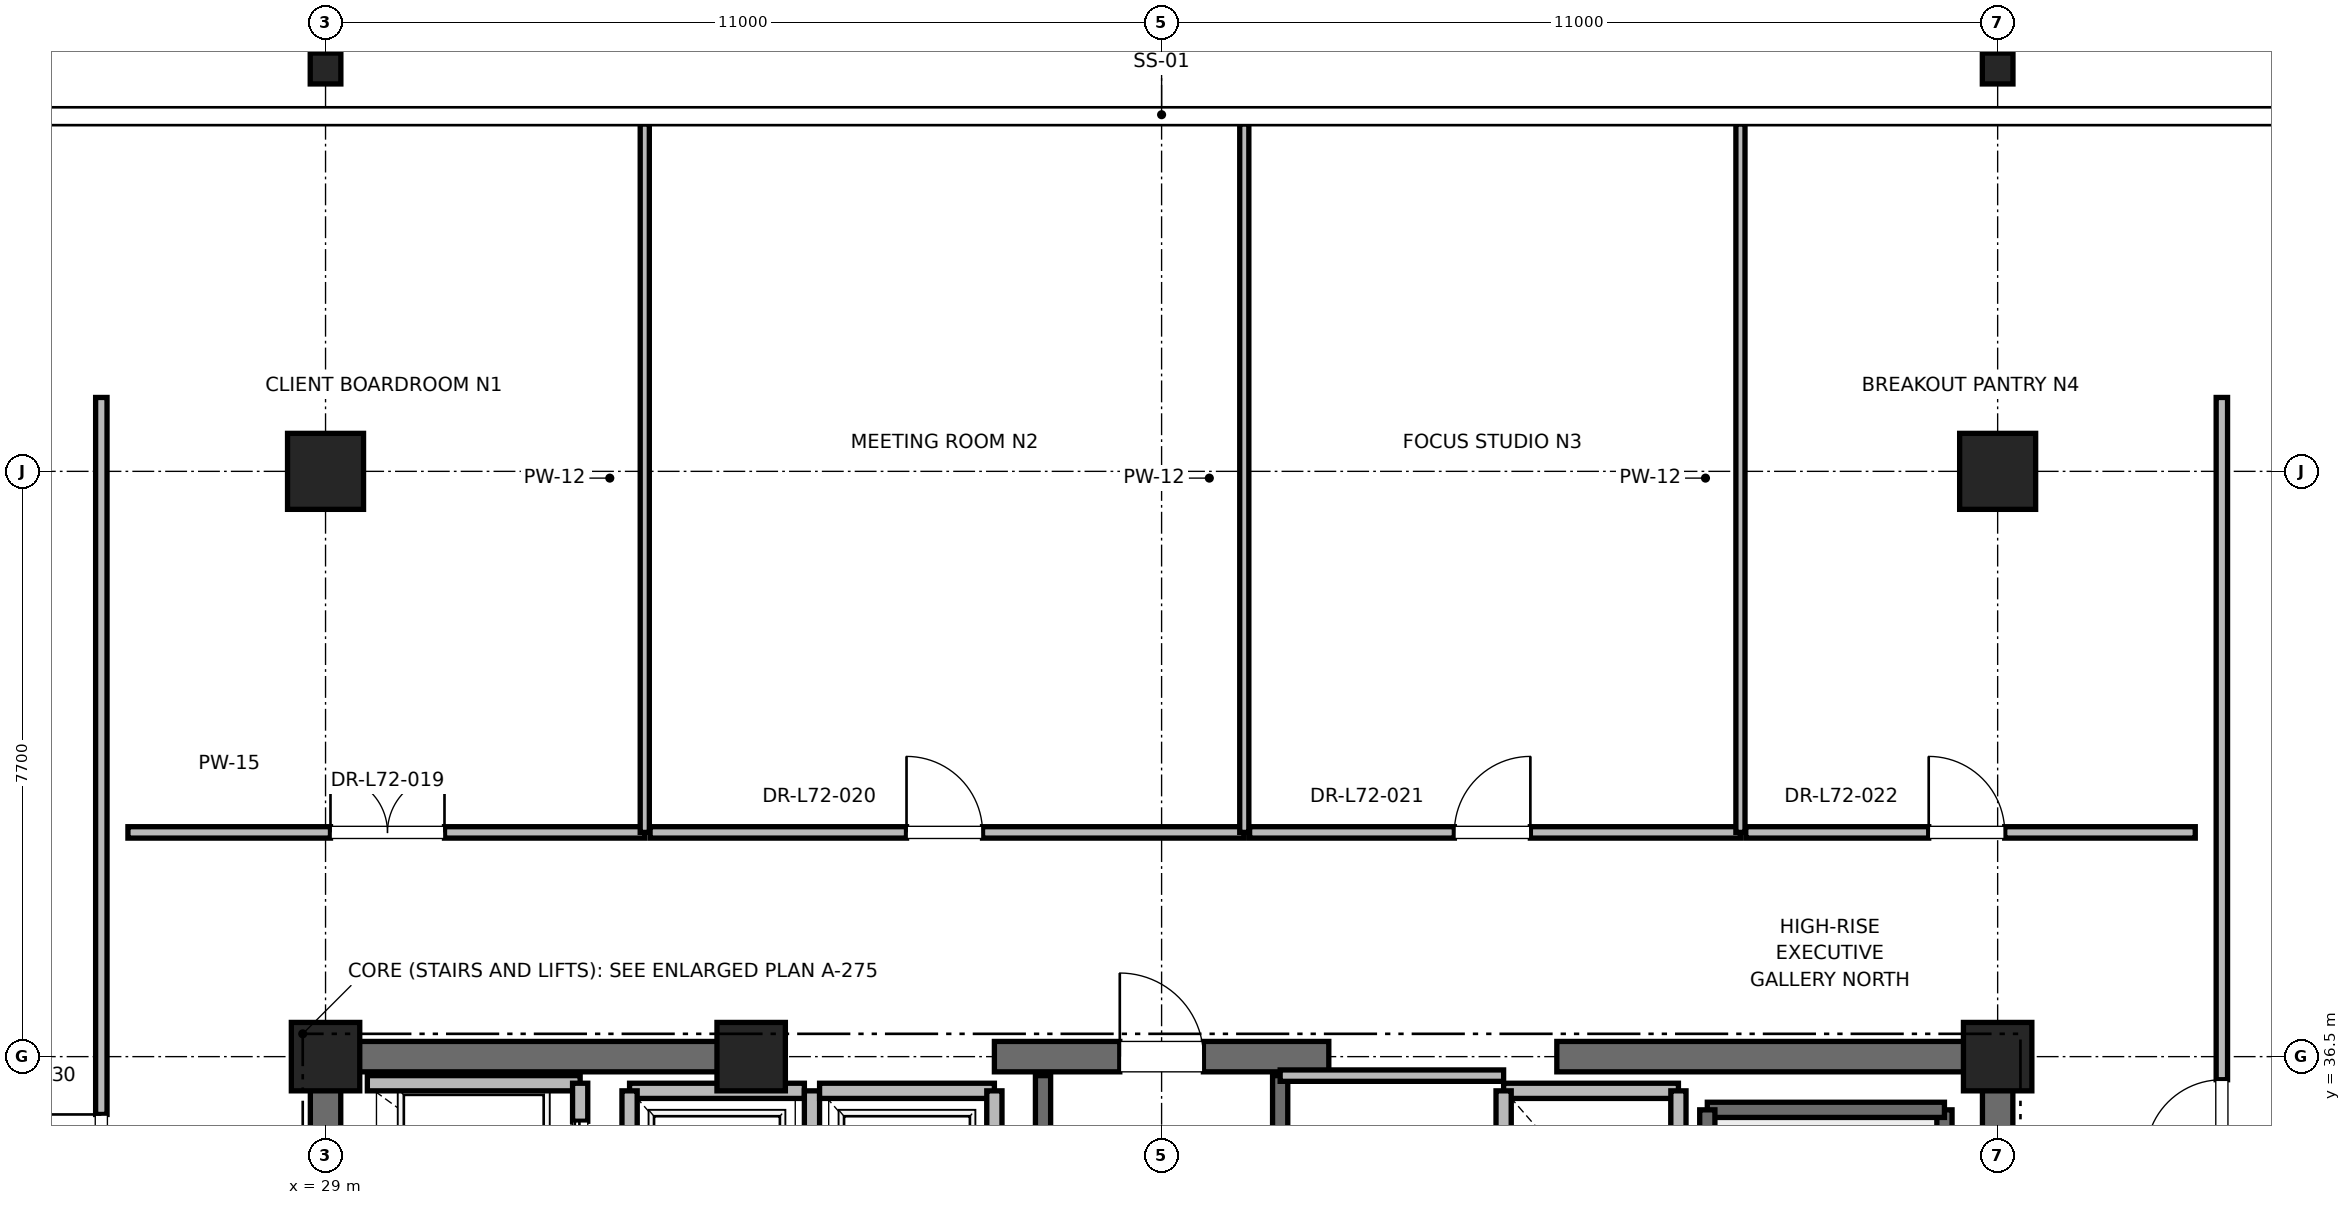
"""IFC4 building model, lengths in metres.
Left out: names, types, materials, properties, quantities, classifications, styles, units other than length and angle.
Written with IfcOpenShell. Run it as: python <this file> out.ifc"""

import sys

from ifc_helpers import new_model, si_unit, direction, frame, frame_2d, origin, origin_2d, place, context, subcontext, project, spatial, rectangle, i_section, extrude, element, fill, save


model = new_model("IFC4")
c1 = context("Model", 3, precision=1e-05, world=origin(), true_north=direction((0.0, 1.0)))
c2 = subcontext(c1, "Body", "Model", "MODEL_VIEW")
j1 = project(units=[si_unit("LENGTHUNIT", "METRE"), si_unit("PLANEANGLEUNIT", "RADIAN")], contexts=[c1])
p1 = place(None, origin())
s1 = spatial("IfcSite", under=j1, at=p1, CompositionType="ELEMENT")
p2 = place(p1, origin())
s2 = spatial("IfcBuilding", under=s1, at=p2, CompositionType="ELEMENT")
p3 = place(p2, frame((0.0, 0.0, 310.8)))
s3 = spatial("IfcBuildingStorey", under=s2, at=p3, CompositionType="ELEMENT", Elevation=310.8)
for number, where, z_axis, x_axis in (
    (1, (29.0, 44.2, 0.0), (0.0, 0.0, 1.0), (1.0, 0.0, 0.0)),
    (2, (51.0, 44.2, 0.0), (0.0, 0.0, 1.0), (1.0, 0.0, 0.0)),
):
    element("IfcColumn", number, at=place(p3, frame(where, z_axis=z_axis, x_axis=x_axis)), inside=s3, PredefinedType="COLUMN", context=c2, shape_type="SweptSolid", body=[
        extrude(rectangle(XDim=1.0, YDim=1.0, at=origin_2d()), origin(), (0.0, 0.0, 1.0), 4.0),
    ])
for number, where, z_axis, x_axis in (
    (3, (29.0, 49.5, 0.0), (0.0, 0.0, 1.0), (1.0, 0.0, 0.0)),
    (4, (51.0, 49.5, 0.0), (0.0, 0.0, 1.0), (1.0, 0.0, 0.0)),
):
    element("IfcColumn", number, at=place(p3, frame(where, z_axis=z_axis, x_axis=x_axis)), inside=s3, PredefinedType="COLUMN", context=c2, shape_type="SweptSolid", body=[
        extrude(i_section(OverallWidth=0.403, OverallDepth=0.406, WebThickness=0.027, FlangeThickness=0.043, FilletRadius=0.015, at=origin_2d()), origin(), (0.0, 0.0, 1.0), 4.0),
    ])
for number, where, z_axis, x_axis in (
    (5, (29.0, 36.5, 0.0), (0.0, 0.0, 1.0), (1.0, 0.0, 0.0)),
    (6, (51.0, 36.5, 0.0), (0.0, 0.0, 1.0), (1.0, 0.0, 0.0)),
    (7, (34.6, 36.5, 0.0), (0.0, 0.0, 1.0), (1.0, 0.0, 0.0)),
):
    element("IfcColumn", number, at=place(p3, frame(where, z_axis=z_axis, x_axis=x_axis)), inside=s3, PredefinedType="PILASTER", context=c2, shape_type="SweptSolid", body=[
        extrude(rectangle(XDim=0.9, YDim=0.9, at=origin_2d()), origin(), (0.0, 0.0, 1.0), 4.0),
    ])
p4 = place(p3, frame((29.0, 36.5, 0.0), z_axis=(0.0, 0.0, 1.0), x_axis=(1.0, 0.0, 0.0)))
e8 = element("IfcWall", 8, at=p4, inside=s3, PredefinedType="SHEAR", context=c2, shape_type="SweptSolid", body=[
    extrude(rectangle(XDim=5.8, YDim=0.4, at=frame_2d((2.9, 0.0))), origin(), (0.0, 0.0, 1.0), 3.785),
])
p5 = place(p3, frame((37.8, 36.5, 0.0), z_axis=(0.0, 0.0, 1.0), x_axis=(1.0, 0.0, 0.0)))
e9 = element("IfcWall", 9, at=p5, inside=s3, PredefinedType="SHEAR", context=c2, shape_type="SweptSolid", body=[
    extrude(rectangle(XDim=4.4, YDim=0.4, at=frame_2d((2.2, 0.0))), origin(), (0.0, 0.0, 1.0), 3.785),
])
p6 = place(p5, frame((1.65, 0.0, 0.0)))
e10 = element("IfcOpeningElement", 10, at=p6, cuts=e9, PredefinedType="OPENING", context=c2, shape_type="SweptSolid", body=[
    extrude(rectangle(XDim=1.1, YDim=2.15, at=frame_2d((0.55, 1.075))), frame((0.0, 0.2, 0.0), z_axis=(0.0, -1.0, 0.0), x_axis=(1.0, 0.0, 0.0)), (0.0, 0.0, 1.0), 0.4),
])
for number, where, z_axis, x_axis in (
    (11, (45.2, 36.5, 0.0), (0.0, 0.0, 1.0), (1.0, 0.0, 0.0)),
    (12, (29.0, 30.7, 0.0), (0.0, 0.0, 1.0), (0.0, 1.0, 0.0)),
):
    element("IfcWall", number, at=place(p3, frame(where, z_axis=z_axis, x_axis=x_axis)), inside=s3, PredefinedType="SHEAR", context=c2, shape_type="SweptSolid", body=[
        extrude(rectangle(XDim=5.8, YDim=0.4, at=frame_2d((2.9, 0.0))), origin(), (0.0, 0.0, 1.0), 3.785),
    ])
p7 = place(p3, frame((51.0, 27.7, 0.0), z_axis=(0.0, 0.0, 1.0), x_axis=(0.0, 1.0, 0.0)))
e13 = element("IfcWall", 13, at=p7, inside=s3, PredefinedType="SHEAR", context=c2, shape_type="SweptSolid", body=[
    extrude(rectangle(XDim=8.8, YDim=0.4, at=frame_2d((4.4, 0.0))), origin(), (0.0, 0.0, 1.0), 3.785),
])
p8 = place(p3, frame((50.3, 27.65, 0.0), z_axis=(0.0, 0.0, 1.0), x_axis=(0.0, 1.0, 0.0)))
e14 = element("IfcWall", 14, at=p8, inside=s3, PredefinedType="SOLIDWALL", context=c2, shape_type="SweptSolid", body=[
    extrude(rectangle(XDim=8.15, YDim=0.2, at=frame_2d((4.075, 0.0))), origin(), (0.0, 0.0, 1.0), 3.785),
])
p9 = place(p3, frame((47.18, 35.8, 0.0), z_axis=(0.0, 0.0, 1.0), x_axis=(1.0, 0.0, 0.0)))
e15 = element("IfcWall", 15, at=p9, inside=s3, PredefinedType="SOLIDWALL", context=c2, shape_type="SweptSolid", body=[
    extrude(rectangle(XDim=3.12, YDim=0.2, at=frame_2d((1.56, 0.0))), origin(), (0.0, 0.0, 1.0), 3.785),
])
p10 = place(p3, frame((47.18, 27.62, 0.0), z_axis=(0.0, 0.0, 1.0), x_axis=(0.0, 1.0, 0.0)))
e16 = element("IfcWall", 16, at=p10, inside=s3, PredefinedType="SOLIDWALL", context=c2, shape_type="SweptSolid", body=[
    extrude(rectangle(XDim=8.18, YDim=0.2, at=frame_2d((4.09, 0.0))), origin(), (0.0, 0.0, 1.0), 3.785),
])
p11 = place(p3, frame((38.44, 27.38, 0.0), z_axis=(0.0, 0.0, 1.0), x_axis=(0.0, 1.0, 0.0)))
e17 = element("IfcWall", 17, at=p11, inside=s3, PredefinedType="SOLIDWALL", context=c2, shape_type="SweptSolid", body=[
    extrude(rectangle(XDim=8.87, YDim=0.2, at=frame_2d((4.435, 0.0))), origin(), (0.0, 0.0, 1.0), 3.785),
])
p12 = place(p3, frame((41.56, 27.68, 0.0), z_axis=(0.0, 0.0, 1.0), x_axis=(0.0, 1.0, 0.0)))
e18 = element("IfcWall", 18, at=p12, inside=s3, PredefinedType="SOLIDWALL", context=c2, shape_type="SweptSolid", body=[
    extrude(rectangle(XDim=8.57, YDim=0.2, at=frame_2d((4.285, 0.0))), origin(), (0.0, 0.0, 1.0), 3.785),
])
p13 = place(p3, frame((32.35, 36.15, 0.0), z_axis=(0.0, 0.0, 1.0), x_axis=(-1.0, 0.0, 0.0)))
e19 = element("IfcWall", 19, at=p13, inside=s3, PredefinedType="SOLIDWALL", context=c2, shape_type="SweptSolid", body=[
    extrude(rectangle(XDim=2.8, YDim=0.2, at=frame_2d((1.4, 0.0))), origin(), (0.0, 0.0, 1.0), 3.22),
])
p14 = place(p3, frame((32.35, 34.05, 0.0), z_axis=(0.0, 0.0, 1.0), x_axis=(0.0, 1.0, 0.0)))
e20 = element("IfcWall", 20, at=p14, inside=s3, PredefinedType="SOLIDWALL", context=c2, shape_type="SweptSolid", body=[
    extrude(rectangle(XDim=2.1, YDim=0.2, at=frame_2d((1.05, 0.0))), origin(), (0.0, 0.0, 1.0), 3.785),
])
p15 = place(p14, frame((0.5, 0.0, 0.0)))
e21 = element("IfcOpeningElement", 21, at=p15, cuts=e20, PredefinedType="OPENING", context=c2, shape_type="SweptSolid", body=[
    extrude(rectangle(XDim=1.1, YDim=2.2, at=frame_2d((0.55, 1.1))), frame((0.0, 0.1, 0.0), z_axis=(0.0, -1.0, 0.0), x_axis=(1.0, 0.0, 0.0)), (0.0, 0.0, 1.0), 0.2),
])
p16 = place(p3, frame((35.3, 36.05, 0.0), z_axis=(0.0, 0.0, 1.0), x_axis=(-1.0, 0.0, 0.0)))
e22 = element("IfcWall", 22, at=p16, inside=s3, PredefinedType="SOLIDWALL", context=c2, shape_type="SweptSolid", body=[
    extrude(rectangle(XDim=2.3, YDim=0.2, at=frame_2d((1.15, 0.0))), origin(), (0.0, 0.0, 1.0), 2.865),
])
p17 = place(p3, frame((33.0, 36.05, 0.0), z_axis=(0.0, 0.0, 1.0), x_axis=(0.0, -1.0, 0.0)))
e23 = element("IfcWall", 23, at=p17, inside=s3, PredefinedType="SOLIDWALL", context=c2, shape_type="SweptSolid", body=[
    extrude(rectangle(XDim=2.6, YDim=0.2, at=frame_2d((1.3, 0.0))), origin(), (0.0, 0.0, 1.0), 3.785),
])
p18 = place(p3, frame((35.4, 33.45, 0.0), z_axis=(0.0, 0.0, 1.0), x_axis=(0.0, 1.0, 0.0)))
e24 = element("IfcWall", 24, at=p18, inside=s3, PredefinedType="SOLIDWALL", context=c2, shape_type="SweptSolid", body=[
    extrude(rectangle(XDim=2.6, YDim=0.2, at=frame_2d((1.3, 0.0))), origin(), (0.0, 0.0, 1.0), 2.865),
])
p19 = place(p3, frame((37.8, 36.05, 0.0), z_axis=(0.0, 0.0, 1.0), x_axis=(-1.0, 0.0, 0.0)))
e25 = element("IfcWall", 25, at=p19, inside=s3, PredefinedType="SOLIDWALL", context=c2, shape_type="SweptSolid", body=[
    extrude(rectangle(XDim=2.3, YDim=0.2, at=frame_2d((1.15, 0.0))), origin(), (0.0, 0.0, 1.0), 2.865),
])
p20 = place(p3, frame((37.8, 33.45, 0.0), z_axis=(0.0, 0.0, 1.0), x_axis=(0.0, 1.0, 0.0)))
e26 = element("IfcWall", 26, at=p20, inside=s3, PredefinedType="SOLIDWALL", context=c2, shape_type="SweptSolid", body=[
    extrude(rectangle(XDim=2.6, YDim=0.2, at=frame_2d((1.3, 0.0))), origin(), (0.0, 0.0, 1.0), 2.865),
])
p21 = place(p3, frame((46.8, 36.05, 0.0), z_axis=(0.0, 0.0, 1.0), x_axis=(-1.0, 0.0, 0.0)))
e27 = element("IfcWall", 27, at=p21, inside=s3, PredefinedType="SOLIDWALL", context=c2, shape_type="SweptSolid", body=[
    extrude(rectangle(XDim=2.3, YDim=0.2, at=frame_2d((1.15, 0.0))), origin(), (0.0, 0.0, 1.0), 2.865),
])
p22 = place(p3, frame((44.5, 36.05, 0.0), z_axis=(0.0, 0.0, 1.0), x_axis=(0.0, -1.0, 0.0)))
e28 = element("IfcWall", 28, at=p22, inside=s3, PredefinedType="SOLIDWALL", context=c2, shape_type="SweptSolid", body=[
    extrude(rectangle(XDim=2.6, YDim=0.2, at=frame_2d((1.3, 0.0))), origin(), (0.0, 0.0, 1.0), 2.865),
])
p23 = place(p3, frame((46.8, 33.45, 0.0), z_axis=(0.0, 0.0, 1.0), x_axis=(0.0, 1.0, 0.0)))
e29 = element("IfcWall", 29, at=p23, inside=s3, PredefinedType="SOLIDWALL", context=c2, shape_type="SweptSolid", body=[
    extrude(rectangle(XDim=2.6, YDim=0.2, at=frame_2d((1.3, 0.0))), origin(), (0.0, 0.0, 1.0), 3.785),
])
p24 = place(p3, frame((41.56, 36.25, 0.0), z_axis=(0.0, 0.0, 1.0), x_axis=(1.0, 0.0, 0.0)))
e30 = element("IfcWall", 30, at=p24, inside=s3, PredefinedType="PARTITIONING", context=c2, shape_type="SweptSolid", body=[
    extrude(rectangle(XDim=2.94, YDim=0.15, at=frame_2d((1.47, 0.0))), origin(), (0.0, 0.0, 1.0), 2.85),
])
p25 = place(p3, frame((26.4, 39.45, 0.0), z_axis=(0.0, 0.0, 1.0), x_axis=(1.0, 0.0, 0.0)))
e31 = element("IfcWall", 31, at=p25, inside=s3, PredefinedType="PARTITIONING", context=c2, shape_type="SweptSolid", body=[
    extrude(rectangle(XDim=6.8, YDim=0.15, at=frame_2d((3.4, 0.0))), origin(), (0.0, 0.0, 1.0), 2.85),
])
p26 = place(p25, frame((2.665, 0.0, 0.0)))
e32 = element("IfcOpeningElement", 32, at=p26, cuts=e31, PredefinedType="OPENING", context=c2, shape_type="SweptSolid", body=[
    extrude(rectangle(XDim=1.5, YDim=2.25, at=frame_2d((0.75, 1.125))), frame((0.0, 0.075, 0.0), z_axis=(0.0, -1.0, 0.0), x_axis=(1.0, 0.0, 0.0)), (0.0, 0.0, 1.0), 0.15),
])
p27 = place(p3, frame((33.2, 39.45, 0.0), z_axis=(0.0, 0.0, 1.0), x_axis=(0.0, 1.0, 0.0)))
e33 = element("IfcWall", 33, at=p27, inside=s3, PredefinedType="PARTITIONING", context=c2, shape_type="SweptSolid", body=[
    extrude(rectangle(XDim=9.322, YDim=0.12, at=frame_2d((4.661, 0.0))), origin(), (0.0, 0.0, 1.0), 2.415),
])
p28 = place(p3, frame((33.27, 39.45, 0.0), z_axis=(0.0, 0.0, 1.0), x_axis=(1.0, 0.0, 0.0)))
e34 = element("IfcWall", 34, at=p28, inside=s3, PredefinedType="PARTITIONING", context=c2, shape_type="SweptSolid", body=[
    extrude(rectangle(XDim=7.818, YDim=0.15, at=frame_2d((3.909, 0.0))), origin(), (0.0, 0.0, 1.0), 2.85),
])
p29 = place(p28, frame((3.374, 0.0, 0.0)))
e35 = element("IfcOpeningElement", 35, at=p29, cuts=e34, PredefinedType="OPENING", context=c2, shape_type="SweptSolid", body=[
    extrude(rectangle(XDim=1.0, YDim=2.15, at=frame_2d((0.5, 1.075))), frame((0.0, 0.075, 0.0), z_axis=(0.0, -1.0, 0.0), x_axis=(1.0, 0.0, 0.0)), (0.0, 0.0, 1.0), 0.15),
])
p30 = place(p3, frame((41.088, 39.45, 0.0), z_axis=(0.0, 0.0, 1.0), x_axis=(0.0, 1.0, 0.0)))
e36 = element("IfcWall", 36, at=p30, inside=s3, PredefinedType="PARTITIONING", context=c2, shape_type="SweptSolid", body=[
    extrude(rectangle(XDim=9.322, YDim=0.12, at=frame_2d((4.661, 0.0))), origin(), (0.0, 0.0, 1.0), 2.415),
])
p31 = place(p3, frame((41.158, 39.45, 0.0), z_axis=(0.0, 0.0, 1.0), x_axis=(1.0, 0.0, 0.0)))
e37 = element("IfcWall", 37, at=p31, inside=s3, PredefinedType="PARTITIONING", context=c2, shape_type="SweptSolid", body=[
    extrude(rectangle(XDim=6.458, YDim=0.15, at=frame_2d((3.229, 0.0))), origin(), (0.0, 0.0, 1.0), 2.85),
])
p32 = place(p31, frame((2.694, 0.0, 0.0)))
e38 = element("IfcOpeningElement", 38, at=p32, cuts=e37, PredefinedType="OPENING", context=c2, shape_type="SweptSolid", body=[
    extrude(rectangle(XDim=1.0, YDim=2.15, at=frame_2d((0.5, 1.075))), frame((0.0, 0.075, 0.0), z_axis=(0.0, -1.0, 0.0), x_axis=(1.0, 0.0, 0.0)), (0.0, 0.0, 1.0), 0.15),
])
p33 = place(p3, frame((47.616, 39.45, 0.0), z_axis=(0.0, 0.0, 1.0), x_axis=(0.0, 1.0, 0.0)))
e39 = element("IfcWall", 39, at=p33, inside=s3, PredefinedType="PARTITIONING", context=c2, shape_type="SweptSolid", body=[
    extrude(rectangle(XDim=9.322, YDim=0.12, at=frame_2d((4.661, 0.0))), origin(), (0.0, 0.0, 1.0), 2.415),
])
p34 = place(p3, frame((47.686, 39.45, 0.0), z_axis=(0.0, 0.0, 1.0), x_axis=(1.0, 0.0, 0.0)))
e40 = element("IfcWall", 40, at=p34, inside=s3, PredefinedType="PARTITIONING", context=c2, shape_type="SweptSolid", body=[
    extrude(rectangle(XDim=5.914, YDim=0.15, at=frame_2d((2.957, 0.0))), origin(), (0.0, 0.0, 1.0), 2.85),
])
p35 = place(p34, frame((2.407, 0.0, 0.0)))
e41 = element("IfcOpeningElement", 41, at=p35, cuts=e40, PredefinedType="OPENING", context=c2, shape_type="SweptSolid", body=[
    extrude(rectangle(XDim=1.0, YDim=2.15, at=frame_2d((0.5, 1.075))), frame((0.0, 0.075, 0.0), z_axis=(0.0, -1.0, 0.0), x_axis=(1.0, 0.0, 0.0)), (0.0, 0.0, 1.0), 0.15),
])
p36 = place(p3, frame((26.05, 33.579, 0.0), z_axis=(0.0, 0.0, 1.0), x_axis=(0.0, 1.0, 0.0)))
e42 = element("IfcWall", 42, at=p36, inside=s3, PredefinedType="PARTITIONING", context=c2, shape_type="SweptSolid", body=[
    extrude(rectangle(XDim=11.594, YDim=0.15, at=frame_2d((5.797, 0.0))), origin(), (0.0, 0.0, 1.0), 2.85),
])
p37 = place(p36, frame((0.661, 0.0, 0.0)))
e43 = element("IfcOpeningElement", 43, at=p37, cuts=e42, PredefinedType="OPENING", context=c2, shape_type="SweptSolid", body=[
    extrude(rectangle(XDim=1.5, YDim=2.25, at=frame_2d((0.75, 1.125))), frame((0.0, 0.075, 0.0), z_axis=(0.0, -1.0, 0.0), x_axis=(1.0, 0.0, 0.0)), (0.0, 0.0, 1.0), 0.15),
])
p38 = place(p3, frame((53.95, 34.992, 0.0), z_axis=(0.0, 0.0, 1.0), x_axis=(0.0, 1.0, 0.0)))
e44 = element("IfcWall", 44, at=p38, inside=s3, PredefinedType="PARTITIONING", context=c2, shape_type="SweptSolid", body=[
    extrude(rectangle(XDim=10.18, YDim=0.15, at=frame_2d((5.09, 0.0))), origin(), (0.0, 0.0, 1.0), 2.85),
])
p39 = place(p38, frame((0.204, 0.0, 0.0)))
e45 = element("IfcOpeningElement", 45, at=p39, cuts=e44, PredefinedType="OPENING", context=c2, shape_type="SweptSolid", body=[
    extrude(rectangle(XDim=1.0, YDim=2.15, at=frame_2d((0.5, 1.075))), frame((0.0, 0.075, 0.0), z_axis=(0.0, -1.0, 0.0), x_axis=(1.0, 0.0, 0.0)), (0.0, 0.0, 1.0), 0.15),
])
p40 = place(p6, origin())
e46 = element("IfcDoor", 46, at=p40, inside=s3, OperationType="SINGLE_SWING_LEFT", PredefinedType="DOOR", context=c2, shape_type="SweptSolid", body=[
    extrude(rectangle(XDim=1.1, YDim=2.15, at=frame_2d((0.55, 1.075))), frame((0.0, 0.025, 0.0), z_axis=(0.0, -1.0, 0.0), x_axis=(1.0, 0.0, 0.0)), (0.0, 0.0, 1.0), 0.05),
])
fill(e10, e46)
p41 = place(p15, origin())
e47 = element("IfcDoor", 47, at=p41, inside=s3, OperationType="SLIDING_TO_RIGHT", PredefinedType="DOOR", context=c2, shape_type="SweptSolid", body=[
    extrude(rectangle(XDim=1.1, YDim=2.2, at=frame_2d((0.55, 1.1))), frame((0.0, 0.025, 0.0), z_axis=(0.0, -1.0, 0.0), x_axis=(1.0, 0.0, 0.0)), (0.0, 0.0, 1.0), 0.05),
])
fill(e21, e47)
p42 = place(p26, origin())
e48 = element("IfcDoor", 48, at=p42, inside=s3, OperationType="DOUBLE_DOOR_SINGLE_SWING", PredefinedType="DOOR", context=c2, shape_type="SweptSolid", body=[
    extrude(rectangle(XDim=1.5, YDim=2.25, at=frame_2d((0.75, 1.125))), frame((0.0, 0.025, 0.0), z_axis=(0.0, -1.0, 0.0), x_axis=(1.0, 0.0, 0.0)), (0.0, 0.0, 1.0), 0.05),
])
fill(e32, e48)
p43 = place(p29, origin())
e49 = element("IfcDoor", 49, at=p43, inside=s3, OperationType="SINGLE_SWING_LEFT", PredefinedType="DOOR", context=c2, shape_type="SweptSolid", body=[
    extrude(rectangle(XDim=1.0, YDim=2.15, at=frame_2d((0.5, 1.075))), frame((0.0, 0.025, 0.0), z_axis=(0.0, -1.0, 0.0), x_axis=(1.0, 0.0, 0.0)), (0.0, 0.0, 1.0), 0.05),
])
fill(e35, e49)
p44 = place(p32, origin())
e50 = element("IfcDoor", 50, at=p44, inside=s3, OperationType="SINGLE_SWING_RIGHT", PredefinedType="DOOR", context=c2, shape_type="SweptSolid", body=[
    extrude(rectangle(XDim=1.0, YDim=2.15, at=frame_2d((0.5, 1.075))), frame((0.0, 0.025, 0.0), z_axis=(0.0, -1.0, 0.0), x_axis=(1.0, 0.0, 0.0)), (0.0, 0.0, 1.0), 0.05),
])
fill(e38, e50)
p45 = place(p35, origin())
e51 = element("IfcDoor", 51, at=p45, inside=s3, OperationType="SINGLE_SWING_LEFT", PredefinedType="DOOR", context=c2, shape_type="SweptSolid", body=[
    extrude(rectangle(XDim=1.0, YDim=2.15, at=frame_2d((0.5, 1.075))), frame((0.0, 0.025, 0.0), z_axis=(0.0, -1.0, 0.0), x_axis=(1.0, 0.0, 0.0)), (0.0, 0.0, 1.0), 0.05),
])
fill(e41, e51)
p46 = place(p37, origin())
e52 = element("IfcDoor", 52, at=p46, inside=s3, OperationType="DOUBLE_DOOR_SINGLE_SWING", PredefinedType="DOOR", context=c2, shape_type="SweptSolid", body=[
    extrude(rectangle(XDim=1.5, YDim=2.25, at=frame_2d((0.75, 1.125))), frame((0.0, 0.025, 0.0), z_axis=(0.0, -1.0, 0.0), x_axis=(1.0, 0.0, 0.0)), (0.0, 0.0, 1.0), 0.05),
])
fill(e43, e52)
p47 = place(p39, origin())
e53 = element("IfcDoor", 53, at=p47, inside=s3, OperationType="SINGLE_SWING_LEFT", PredefinedType="DOOR", context=c2, shape_type="SweptSolid", body=[
    extrude(rectangle(XDim=1.0, YDim=2.15, at=frame_2d((0.5, 1.075))), frame((0.0, 0.025, 0.0), z_axis=(0.0, -1.0, 0.0), x_axis=(1.0, 0.0, 0.0)), (0.0, 0.0, 1.0), 0.05),
])
fill(e45, e53)
save(model, sys.argv[1])
